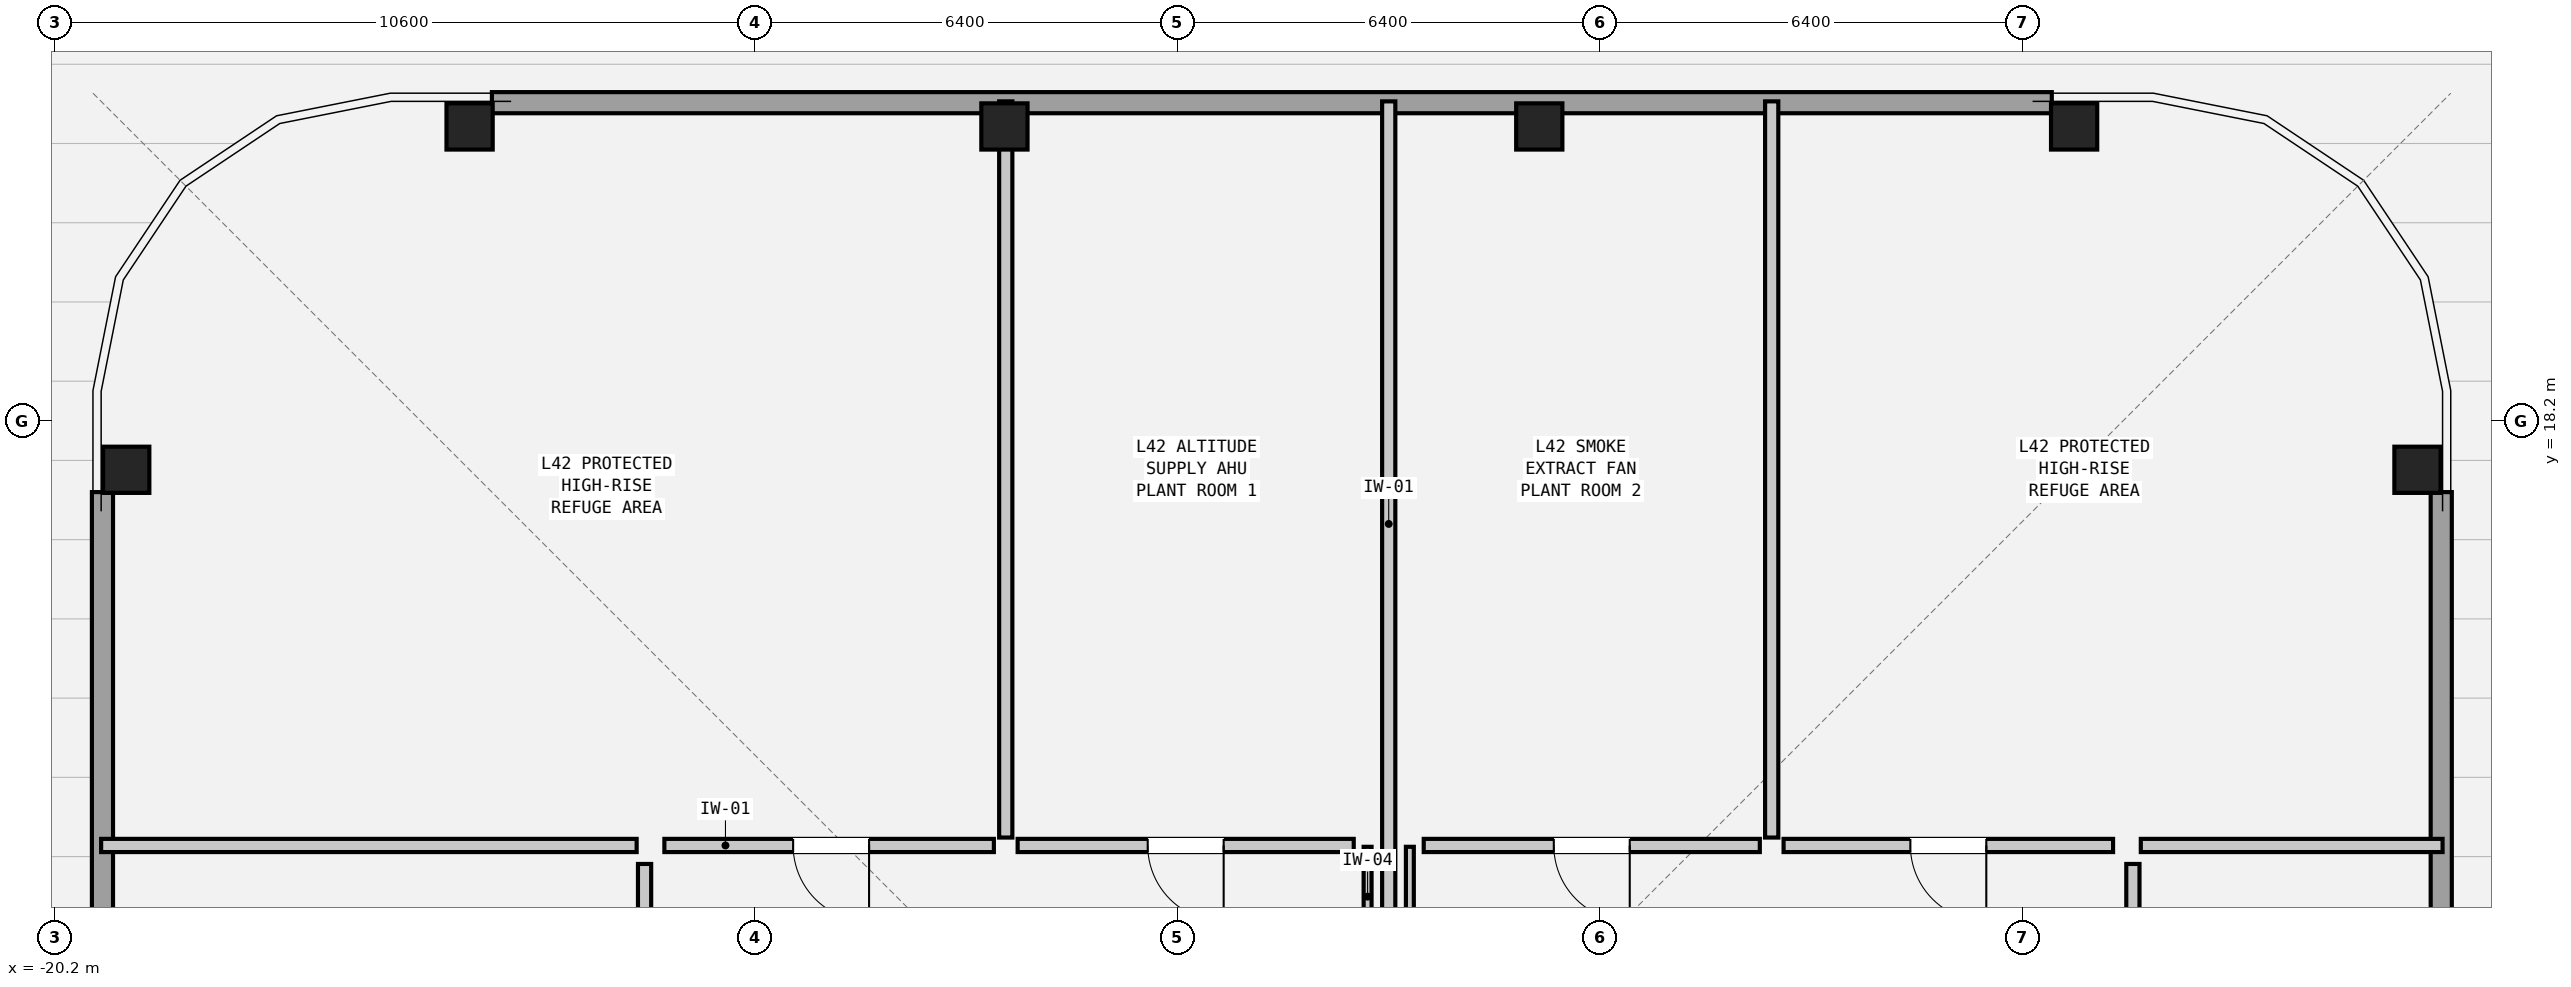
"""IFC4 building model, lengths in metres.
Left out: names, types, materials, properties, quantities, classifications, styles, units other than length and angle.
Written with IfcOpenShell. Run it as: python <this file> out.ifc"""

import sys

from ifc_helpers import new_model, si_unit, direction, frame, frame_2d, origin, origin_2d, place, context, subcontext, project, spatial, rectangle, hollow_rectangle, extrude, element, fill, save


model = new_model("IFC4")
c1 = context("Model", 3, precision=1e-05, world=origin(), true_north=direction((0.0, 1.0)))
c2 = subcontext(c1, "Body", "Model", "MODEL_VIEW")
j1 = project(units=[si_unit("LENGTHUNIT", "METRE"), si_unit("PLANEANGLEUNIT", "RADIAN")], contexts=[c1])
p1 = place(None, origin())
s1 = spatial("IfcSite", under=j1, at=p1, CompositionType="ELEMENT")
p2 = place(p1, origin())
s2 = spatial("IfcBuilding", under=s1, at=p2, CompositionType="ELEMENT")
p3 = place(p2, frame((0.0, 0.0, 144.6)))
s3 = spatial("IfcBuildingStorey", under=s2, at=p3, CompositionType="ELEMENT", Elevation=144.6)
for number, where, z_axis, x_axis in (
    (1, (15.58, 17.46, 0.0), (0.0, 0.0, 1.0), (0.0, 1.0, 0.0)),
    (2, (10.38, 22.66, 0.0), (0.0, 0.0, 1.0), (1.0, 0.0, 0.0)),
    (3, (2.28, 22.66, 0.0), (0.0, 0.0, 1.0), (1.0, 0.0, 0.0)),
    (4, (-5.82, 22.66, 0.0), (0.0, 0.0, 1.0), (1.0, 0.0, 0.0)),
    (5, (-13.92, 22.66, 0.0), (0.0, 0.0, 1.0), (1.0, 0.0, 0.0)),
    (6, (-19.12, 17.46, 0.0), (0.0, 0.0, 1.0), (0.0, 1.0, 0.0)),
):
    element("IfcColumn", number, at=place(p3, frame(where, z_axis=z_axis, x_axis=x_axis)), inside=s3, PredefinedType="COLUMN", context=c2, shape_type="SweptSolid", body=[
        extrude(hollow_rectangle(XDim=0.7, YDim=0.7, WallThickness=0.045, at=origin_2d()), origin(), (0.0, 0.0, 1.0), 3.6),
    ])
for number, where, z_axis, x_axis in (
    (7, (15.94, 17.122, 0.0), (0.0, 0.0, 1.0), (0.0, -1.0, 0.0)),
    (8, (-13.582, 23.02, 0.0), (0.0, 0.0, 1.0), (1.0, 0.0, 0.0)),
    (9, (-19.48, -6.502, 0.0), (0.0, 0.0, 1.0), (0.0, 1.0, 0.0)),
):
    element("IfcWall", number, at=place(p3, frame(where, z_axis=z_axis, x_axis=x_axis)), inside=s3, PredefinedType="SOLIDWALL", context=c2, shape_type="SweptSolid", body=[
        extrude(rectangle(XDim=23.624, YDim=0.32, at=frame_2d((11.812, 0.0))), origin(), (0.0, 0.0, 1.0), 2.242),
    ])
p4 = place(p3, frame((0.0, 10.24, 0.0), z_axis=(0.0, 0.0, 1.0), x_axis=(0.0, 1.0, 0.0)))
e10 = element("IfcWall", 10, at=p4, inside=s3, PredefinedType="PARTITIONING", context=c2, shape_type="SweptSolid", body=[
    extrude(rectangle(XDim=12.8, YDim=0.2, at=frame_2d((6.4, 0.0))), origin(), (0.0, 0.0, 1.0), 2.901),
])
for number, where, z_axis, x_axis in (
    (11, (-0.32, 10.24, 0.0), (0.0, 0.0, 1.0), (0.0, 1.0, 0.0)),
    (12, (0.32, 10.24, 0.0), (0.0, 0.0, 1.0), (0.0, 1.0, 0.0)),
):
    element("IfcWall", number, at=place(p3, frame(where, z_axis=z_axis, x_axis=x_axis)), inside=s3, PredefinedType="PARTITIONING", context=c2, shape_type="SweptSolid", body=[
        extrude(rectangle(XDim=1.51, YDim=0.12, at=frame_2d((0.755, 0.0))), origin(), (0.0, 0.0, 1.0), 2.901),
    ])
p5 = place(p3, frame((-5.98, 11.77, 0.0), z_axis=(0.0, 0.0, 1.0), x_axis=(-1.0, 0.0, 0.0)))
e13 = element("IfcWall", 13, at=p5, inside=s3, PredefinedType="PARTITIONING", context=c2, shape_type="SweptSolid", body=[
    extrude(rectangle(XDim=4.99, YDim=0.2, at=frame_2d((2.495, 0.0))), origin(), (0.0, 0.0, 1.0), 3.38),
])
p6 = place(p5, frame((1.89, 0.0, 0.0)))
e14 = element("IfcOpeningElement", 14, at=p6, cuts=e13, PredefinedType="OPENING", context=c2, shape_type="SweptSolid", body=[
    extrude(rectangle(XDim=1.15, YDim=2.1, at=frame_2d((0.575, 1.05))), frame((0.0, 0.112, 0.0), z_axis=(0.0, -1.0, 0.0), x_axis=(1.0, 0.0, 0.0)), (0.0, 0.0, 1.0), 0.224),
])
p7 = place(p3, frame((-5.8, 11.89, 0.0), z_axis=(0.0, 0.0, 1.0), x_axis=(0.0, 1.0, 0.0)))
e15 = element("IfcWall", 15, at=p7, inside=s3, PredefinedType="PARTITIONING", context=c2, shape_type="SweptSolid", body=[
    extrude(rectangle(XDim=11.15, YDim=0.2, at=frame_2d((5.575, 0.0))), origin(), (0.0, 0.0, 1.0), 2.901),
])
p8 = place(p3, frame((-0.53, 11.77, 0.0), z_axis=(0.0, 0.0, 1.0), x_axis=(-1.0, 0.0, 0.0)))
e16 = element("IfcWall", 16, at=p8, inside=s3, PredefinedType="PARTITIONING", context=c2, shape_type="SweptSolid", body=[
    extrude(rectangle(XDim=5.09, YDim=0.2, at=frame_2d((2.545, 0.0))), origin(), (0.0, 0.0, 1.0), 3.38),
])
p9 = place(p8, frame((1.97, 0.0, 0.0)))
e17 = element("IfcOpeningElement", 17, at=p9, cuts=e16, PredefinedType="OPENING", context=c2, shape_type="SweptSolid", body=[
    extrude(rectangle(XDim=1.15, YDim=2.1, at=frame_2d((0.575, 1.05))), frame((0.0, 0.112, 0.0), z_axis=(0.0, -1.0, 0.0), x_axis=(1.0, 0.0, 0.0)), (0.0, 0.0, 1.0), 0.224),
])
p10 = place(p3, frame((5.62, 11.77, 0.0), z_axis=(0.0, 0.0, 1.0), x_axis=(-1.0, 0.0, 0.0)))
e18 = element("IfcWall", 18, at=p10, inside=s3, PredefinedType="PARTITIONING", context=c2, shape_type="SweptSolid", body=[
    extrude(rectangle(XDim=5.09, YDim=0.2, at=frame_2d((2.545, 0.0))), origin(), (0.0, 0.0, 1.0), 3.38),
])
p11 = place(p10, frame((1.97, 0.0, 0.0)))
e19 = element("IfcOpeningElement", 19, at=p11, cuts=e18, PredefinedType="OPENING", context=c2, shape_type="SweptSolid", body=[
    extrude(rectangle(XDim=1.15, YDim=2.1, at=frame_2d((0.575, 1.05))), frame((0.0, 0.112, 0.0), z_axis=(0.0, -1.0, 0.0), x_axis=(1.0, 0.0, 0.0)), (0.0, 0.0, 1.0), 0.224),
])
p12 = place(p3, frame((5.8, 11.89, 0.0), z_axis=(0.0, 0.0, 1.0), x_axis=(0.0, 1.0, 0.0)))
e20 = element("IfcWall", 20, at=p12, inside=s3, PredefinedType="PARTITIONING", context=c2, shape_type="SweptSolid", body=[
    extrude(rectangle(XDim=11.15, YDim=0.2, at=frame_2d((5.575, 0.0))), origin(), (0.0, 0.0, 1.0), 2.901),
])
p13 = place(p3, frame((10.97, 11.77, 0.0), z_axis=(0.0, 0.0, 1.0), x_axis=(-1.0, 0.0, 0.0)))
e21 = element("IfcWall", 21, at=p13, inside=s3, PredefinedType="PARTITIONING", context=c2, shape_type="SweptSolid", body=[
    extrude(rectangle(XDim=4.99, YDim=0.2, at=frame_2d((2.495, 0.0))), origin(), (0.0, 0.0, 1.0), 3.38),
])
p14 = place(p13, frame((1.92, 0.0, 0.0)))
e22 = element("IfcOpeningElement", 22, at=p14, cuts=e21, PredefinedType="OPENING", context=c2, shape_type="SweptSolid", body=[
    extrude(rectangle(XDim=1.15, YDim=2.1, at=frame_2d((0.575, 1.05))), frame((0.0, 0.112, 0.0), z_axis=(0.0, -1.0, 0.0), x_axis=(1.0, 0.0, 0.0)), (0.0, 0.0, 1.0), 0.224),
])
p15 = place(p3, frame((-19.5, 11.77, 0.0), z_axis=(0.0, 0.0, 1.0), x_axis=(1.0, 0.0, 0.0)))
e23 = element("IfcWall", 23, at=p15, inside=s3, PredefinedType="PARTITIONING", context=c2, shape_type="SweptSolid", body=[
    extrude(rectangle(XDim=8.11, YDim=0.2, at=frame_2d((4.055, 0.0))), origin(), (0.0, 0.0, 1.0), 3.38),
])
p16 = place(p3, frame((11.39, 11.77, 0.0), z_axis=(0.0, 0.0, 1.0), x_axis=(1.0, 0.0, 0.0)))
e24 = element("IfcWall", 24, at=p16, inside=s3, PredefinedType="PARTITIONING", context=c2, shape_type="SweptSolid", body=[
    extrude(rectangle(XDim=4.57, YDim=0.2, at=frame_2d((2.285, 0.0))), origin(), (0.0, 0.0, 1.0), 3.38),
])
p17 = place(p3, frame((-11.27, 11.49, 0.0), z_axis=(0.0, 0.0, 1.0), x_axis=(0.0, -1.0, 0.0)))
e25 = element("IfcWall", 25, at=p17, inside=s3, PredefinedType="PARTITIONING", context=c2, shape_type="SweptSolid", body=[
    extrude(rectangle(XDim=10.68, YDim=0.2, at=frame_2d((5.34, 0.0))), origin(), (0.0, 0.0, 1.0), 3.38),
])
p18 = place(p17, frame((4.765, 0.0, 0.0)))
e26 = element("IfcOpeningElement", 26, at=p18, cuts=e25, PredefinedType="OPENING", context=c2, shape_type="SweptSolid", body=[
    extrude(rectangle(XDim=1.15, YDim=2.1, at=frame_2d((0.575, 1.05))), frame((0.0, 0.112, 0.0), z_axis=(0.0, -1.0, 0.0), x_axis=(1.0, 0.0, 0.0)), (0.0, 0.0, 1.0), 0.224),
])
p19 = place(p3, frame((11.27, 0.81, 0.0), z_axis=(0.0, 0.0, 1.0), x_axis=(0.0, 1.0, 0.0)))
e27 = element("IfcWall", 27, at=p19, inside=s3, PredefinedType="PARTITIONING", context=c2, shape_type="SweptSolid", body=[
    extrude(rectangle(XDim=10.68, YDim=0.2, at=frame_2d((5.34, 0.0))), origin(), (0.0, 0.0, 1.0), 3.38),
])
p20 = place(p19, frame((6.047, 0.0, 0.0)))
e28 = element("IfcOpeningElement", 28, at=p20, cuts=e27, PredefinedType="OPENING", context=c2, shape_type="SweptSolid", body=[
    extrude(rectangle(XDim=1.15, YDim=2.1, at=frame_2d((0.575, 1.05))), frame((0.0, 0.112, 0.0), z_axis=(0.0, -1.0, 0.0), x_axis=(1.0, 0.0, 0.0)), (0.0, 0.0, 1.0), 0.224),
])
p21 = place(p6, origin())
e29 = element("IfcDoor", 29, at=p21, inside=s3, OperationType="SINGLE_SWING_LEFT", PredefinedType="DOOR", context=c2, shape_type="SweptSolid", body=[
    extrude(rectangle(XDim=1.15, YDim=2.1, at=frame_2d((0.575, 1.05))), frame((0.0, 0.025, 0.0), z_axis=(0.0, -1.0, 0.0), x_axis=(1.0, 0.0, 0.0)), (0.0, 0.0, 1.0), 0.05),
])
fill(e14, e29)
p22 = place(p9, origin())
e30 = element("IfcDoor", 30, at=p22, inside=s3, OperationType="SINGLE_SWING_LEFT", PredefinedType="DOOR", context=c2, shape_type="SweptSolid", body=[
    extrude(rectangle(XDim=1.15, YDim=2.1, at=frame_2d((0.575, 1.05))), frame((0.0, 0.025, 0.0), z_axis=(0.0, -1.0, 0.0), x_axis=(1.0, 0.0, 0.0)), (0.0, 0.0, 1.0), 0.05),
])
fill(e17, e30)
p23 = place(p11, origin())
e31 = element("IfcDoor", 31, at=p23, inside=s3, OperationType="SINGLE_SWING_LEFT", PredefinedType="DOOR", context=c2, shape_type="SweptSolid", body=[
    extrude(rectangle(XDim=1.15, YDim=2.1, at=frame_2d((0.575, 1.05))), frame((0.0, 0.025, 0.0), z_axis=(0.0, -1.0, 0.0), x_axis=(1.0, 0.0, 0.0)), (0.0, 0.0, 1.0), 0.05),
])
fill(e19, e31)
p24 = place(p14, origin())
e32 = element("IfcDoor", 32, at=p24, inside=s3, OperationType="SINGLE_SWING_LEFT", PredefinedType="DOOR", context=c2, shape_type="SweptSolid", body=[
    extrude(rectangle(XDim=1.15, YDim=2.1, at=frame_2d((0.575, 1.05))), frame((0.0, 0.025, 0.0), z_axis=(0.0, -1.0, 0.0), x_axis=(1.0, 0.0, 0.0)), (0.0, 0.0, 1.0), 0.05),
])
fill(e22, e32)
save(model, sys.argv[1])
